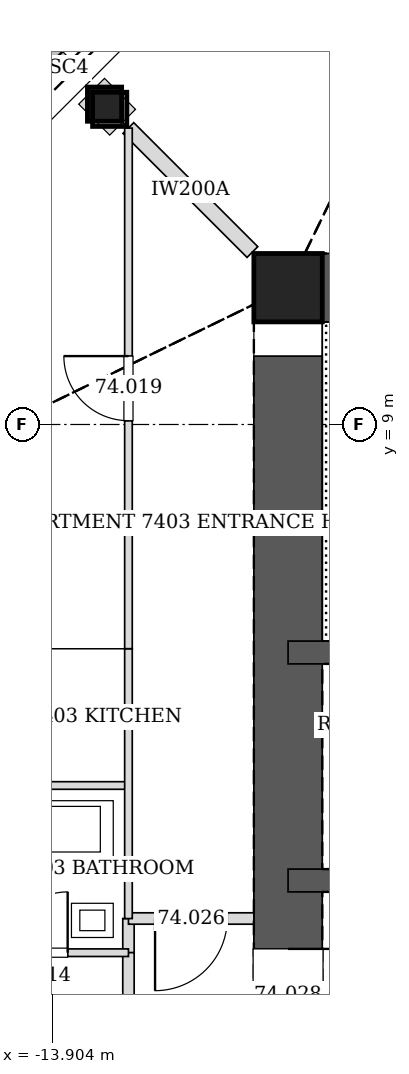
"""IFC4 building model, lengths in metres.
Left out: names, types, materials, properties, quantities, classifications, styles, units other than length and angle.
Written with IfcOpenShell. Run it as: python <this file> out.ifc"""

import sys

from ifc_helpers import new_model, si_unit, direction, frame, frame_2d, origin, origin_2d, place, context, subcontext, project, spatial, rectangle, hollow_rectangle, extrude, element, fill, save


model = new_model("IFC4")
c1 = context("Model", 3, precision=1e-05, world=origin(), true_north=direction((0.0, 1.0)))
c2 = subcontext(c1, "Body", "Model", "MODEL_VIEW")
j1 = project(units=[si_unit("LENGTHUNIT", "METRE"), si_unit("PLANEANGLEUNIT", "RADIAN")], contexts=[c1])
p1 = place(None, origin())
s1 = spatial("IfcSite", under=j1, at=p1, CompositionType="ELEMENT")
p2 = place(p1, origin())
s2 = spatial("IfcBuilding", under=s1, at=p2, CompositionType="ELEMENT")
p3 = place(p2, frame((0.0, 0.0, 301.4)))
s3 = spatial("IfcBuildingStorey", under=s2, at=p3, CompositionType="ELEMENT", Elevation=301.4)
p4 = place(p3, frame((-13.215, 13.215, 0.0), z_axis=(0.020024994503, -0.020024994503, 0.999598919162), x_axis=(0.707106781187, 0.707106781187, 0.0)))
e1 = element("IfcColumn", 1, at=p4, inside=s3, PredefinedType="COLUMN", context=c2, shape_type="SweptSolid", body=[
    extrude(hollow_rectangle(XDim=0.45, YDim=0.45, WallThickness=0.02, at=origin_2d()), origin(), (0.0, 0.0, 1.0), 3.402),
])
p5 = place(p3, frame((-10.8, 10.8, 0.0), z_axis=(0.0, 0.0, 1.0), x_axis=(1.0, 0.0, 0.0)))
e2 = element("IfcColumn", 2, at=p5, inside=s3, PredefinedType="COLUMN", context=c2, shape_type="SweptSolid", body=[
    extrude(hollow_rectangle(XDim=0.9, YDim=0.9, WallThickness=0.04, at=origin_2d()), origin(), (0.0, 0.0, 1.0), 3.4),
])
p6 = place(p3, frame((10.8, 10.8, 0.0), z_axis=(0.0, 0.0, 1.0), x_axis=(-1.0, 0.0, 0.0)))
e3 = element("IfcWall", 3, at=p6, inside=s3, PredefinedType="SOLIDWALL", context=c2, shape_type="SweptSolid", body=[
    extrude(rectangle(XDim=21.6, YDim=0.9, at=frame_2d((10.8, 0.0))), origin(), (0.0, 0.0, 1.0), 3.4),
])
p7 = place(p6, frame((10.05, 0.0, 0.0)))
e4 = element("IfcOpeningElement", 4, at=p7, cuts=e3, PredefinedType="OPENING", context=c2, shape_type="SweptSolid", body=[
    extrude(rectangle(XDim=1.5, YDim=2.1, at=frame_2d((0.75, 1.05))), frame((0.0, 0.46, 0.0), z_axis=(0.0, -1.0, 0.0), x_axis=(1.0, 0.0, 0.0)), (0.0, 0.0, 1.0), 0.92),
])
p8 = place(p3, frame((-10.8, 10.8, 0.0), z_axis=(0.0, 0.0, 1.0), x_axis=(0.0, -1.0, 0.0)))
e5 = element("IfcWall", 5, at=p8, inside=s3, PredefinedType="SOLIDWALL", context=c2, shape_type="SweptSolid", body=[
    extrude(rectangle(XDim=21.6, YDim=0.9, at=frame_2d((10.8, 0.0))), origin(), (0.0, 0.0, 1.0), 3.4),
])
p9 = place(p8, frame((8.7, 0.0, 0.0)))
e6 = element("IfcOpeningElement", 6, at=p9, cuts=e5, PredefinedType="OPENING", context=c2, shape_type="SweptSolid", body=[
    extrude(rectangle(XDim=1.2, YDim=2.1, at=frame_2d((0.6, 1.05))), frame((0.0, 0.46, 0.0), z_axis=(0.0, -1.0, 0.0), x_axis=(1.0, 0.0, 0.0)), (0.0, 0.0, 1.0), 0.92),
])
p10 = place(p8, frame((11.7, 0.0, 0.0)))
e7 = element("IfcOpeningElement", 7, at=p10, cuts=e5, PredefinedType="OPENING", context=c2, shape_type="SweptSolid", body=[
    extrude(rectangle(XDim=1.2, YDim=2.1, at=frame_2d((0.6, 1.05))), frame((0.0, 0.46, 0.0), z_axis=(0.0, -1.0, 0.0), x_axis=(1.0, 0.0, 0.0)), (0.0, 0.0, 1.0), 0.92),
])
p11 = place(p3, frame((-10.8, 3.0, 0.0), z_axis=(0.0, 0.0, 1.0), x_axis=(1.0, 0.0, 0.0)))
e8 = element("IfcWall", 8, at=p11, inside=s3, PredefinedType="SOLIDWALL", context=c2, shape_type="SweptSolid", body=[
    extrude(rectangle(XDim=21.6, YDim=0.3, at=frame_2d((10.8, 0.0))), origin(), (0.0, 0.0, 1.0), 3.4),
])
p12 = place(p11, frame((1.65, 0.0, 0.0)))
e9 = element("IfcOpeningElement", 9, at=p12, cuts=e8, PredefinedType="OPENING", context=c2, shape_type="SweptSolid", body=[
    extrude(rectangle(XDim=0.9, YDim=2.1, at=frame_2d((0.45, 1.05))), frame((0.0, 0.16, 0.0), z_axis=(0.0, -1.0, 0.0), x_axis=(1.0, 0.0, 0.0)), (0.0, 0.0, 1.0), 0.32),
])
p13 = place(p11, frame((4.55, 0.0, 0.0)))
e10 = element("IfcOpeningElement", 10, at=p13, cuts=e8, PredefinedType="OPENING", context=c2, shape_type="SweptSolid", body=[
    extrude(rectangle(XDim=0.9, YDim=2.1, at=frame_2d((0.45, 1.05))), frame((0.0, 0.16, 0.0), z_axis=(0.0, -1.0, 0.0), x_axis=(1.0, 0.0, 0.0)), (0.0, 0.0, 1.0), 0.32),
])
p14 = place(p11, frame((13.25, 0.0, 0.0)))
e11 = element("IfcOpeningElement", 11, at=p14, cuts=e8, PredefinedType="OPENING", context=c2, shape_type="SweptSolid", body=[
    extrude(rectangle(XDim=0.9, YDim=2.1, at=frame_2d((0.45, 1.05))), frame((0.0, 0.16, 0.0), z_axis=(0.0, -1.0, 0.0), x_axis=(1.0, 0.0, 0.0)), (0.0, 0.0, 1.0), 0.32),
])
p15 = place(p11, frame((16.15, 0.0, 0.0)))
e12 = element("IfcOpeningElement", 12, at=p15, cuts=e8, PredefinedType="OPENING", context=c2, shape_type="SweptSolid", body=[
    extrude(rectangle(XDim=0.9, YDim=2.1, at=frame_2d((0.45, 1.05))), frame((0.0, 0.16, 0.0), z_axis=(0.0, -1.0, 0.0), x_axis=(1.0, 0.0, 0.0)), (0.0, 0.0, 1.0), 0.32),
])
p16 = place(p11, frame((7.45, 0.0, 0.0)))
e13 = element("IfcOpeningElement", 13, at=p16, cuts=e8, PredefinedType="OPENING", context=c2, shape_type="SweptSolid", body=[
    extrude(rectangle(XDim=0.9, YDim=2.1, at=frame_2d((0.45, 1.05))), frame((0.0, 0.16, 0.0), z_axis=(0.0, -1.0, 0.0), x_axis=(1.0, 0.0, 0.0)), (0.0, 0.0, 1.0), 0.32),
])
p17 = place(p11, frame((19.05, 0.0, 0.0)))
e14 = element("IfcOpeningElement", 14, at=p17, cuts=e8, PredefinedType="OPENING", context=c2, shape_type="SweptSolid", body=[
    extrude(rectangle(XDim=0.9, YDim=2.1, at=frame_2d((0.45, 1.05))), frame((0.0, 0.16, 0.0), z_axis=(0.0, -1.0, 0.0), x_axis=(1.0, 0.0, 0.0)), (0.0, 0.0, 1.0), 0.32),
])
p18 = place(p3, frame((-10.8, 6.0, 0.0), z_axis=(0.0, 0.0, 1.0), x_axis=(1.0, 0.0, 0.0)))
e15 = element("IfcWall", 15, at=p18, inside=s3, PredefinedType="SOLIDWALL", context=c2, shape_type="SweptSolid", body=[
    extrude(rectangle(XDim=21.6, YDim=0.3, at=frame_2d((10.8, 0.0))), origin(), (0.0, 0.0, 1.0), 3.4),
])
p19 = place(p18, frame((10.25, 0.0, 0.0)))
e16 = element("IfcOpeningElement", 16, at=p19, cuts=e15, PredefinedType="OPENING", context=c2, shape_type="SweptSolid", body=[
    extrude(rectangle(XDim=1.1, YDim=2.1, at=frame_2d((0.55, 1.05))), frame((0.0, 0.16, 0.0), z_axis=(0.0, -1.0, 0.0), x_axis=(1.0, 0.0, 0.0)), (0.0, 0.0, 1.0), 0.32),
])
p20 = place(p3, frame((-12.9, 2.5, 0.0), z_axis=(0.0, 0.0, 1.0), x_axis=(0.0, -1.0, 0.0)))
e17 = element("IfcWall", 17, at=p20, inside=s3, PredefinedType="PARTITIONING", context=c2, shape_type="SweptSolid", body=[
    extrude(rectangle(XDim=0.451, YDim=0.15, at=frame_2d((0.226, 0.0))), origin(), (0.0, 0.0, 1.0), 3.2),
])
p21 = place(p3, frame((-12.9, 2.051, 0.0), z_axis=(0.0, 0.0, 1.0), x_axis=(0.0, -1.0, 0.0)))
e18 = element("IfcWall", 18, at=p21, inside=s3, PredefinedType="PARTITIONING", context=c2, shape_type="SweptSolid", body=[
    extrude(rectangle(XDim=9.602, YDim=0.15, at=frame_2d((4.801, 0.0))), origin(), (0.0, 0.0, 1.0), 2.349),
])
p22 = place(p3, frame((-11.25, 2.5, 0.0), z_axis=(0.0, 0.0, 1.0), x_axis=(-1.0, 0.0, 0.0)))
e19 = element("IfcWall", 19, at=p22, inside=s3, PredefinedType="PARTITIONING", context=c2, shape_type="SweptSolid", body=[
    extrude(rectangle(XDim=1.65, YDim=0.15, at=frame_2d((0.825, 0.0))), origin(), (0.0, 0.0, 1.0), 3.2),
])
p23 = place(p22, frame((0.35, 0.0, 0.0)))
e20 = element("IfcOpeningElement", 20, at=p23, cuts=e19, PredefinedType="OPENING", context=c2, shape_type="SweptSolid", body=[
    extrude(rectangle(XDim=0.95, YDim=2.1, at=frame_2d((0.475, 1.05))), frame((0.0, 0.085, 0.0), z_axis=(0.0, -1.0, 0.0), x_axis=(1.0, 0.0, 0.0)), (0.0, 0.0, 1.0), 0.17),
])
p24 = place(p3, frame((-12.901, 12.901, 0.0), z_axis=(0.0, 0.0, 1.0), x_axis=(0.707106781187, -0.707106781187, 0.0)))
e21 = element("IfcWall", 21, at=p24, inside=s3, PredefinedType="PARTITIONING", context=c2, shape_type="SweptSolid", body=[
    extrude(rectangle(XDim=2.308, YDim=0.2, at=frame_2d((1.154, 0.0))), origin(), (0.0, 0.0, 1.0), 2.591),
])
p25 = place(p3, frame((-15.3, 4.25, 0.0), z_axis=(0.0, 0.0, 1.0), x_axis=(1.0, 0.0, 0.0)))
e22 = element("IfcWall", 22, at=p25, inside=s3, PredefinedType="PARTITIONING", context=c2, shape_type="SweptSolid", body=[
    extrude(rectangle(XDim=2.4, YDim=0.1, at=frame_2d((1.2, 0.0))), origin(), (0.0, 0.0, 1.0), 2.662),
])
p26 = place(p3, frame((-12.9, 6.05, 0.0), z_axis=(0.0, 0.0, 1.0), x_axis=(0.0, -1.0, 0.0)))
e23 = element("IfcWall", 23, at=p26, inside=s3, PredefinedType="PARTITIONING", context=c2, shape_type="SweptSolid", body=[
    extrude(rectangle(XDim=3.551, YDim=0.1, at=frame_2d((1.775, 0.0))), origin(), (0.0, 0.0, 1.0), 3.2),
])
p27 = place(p3, frame((-15.3, 2.05, 0.0), z_axis=(0.0, 0.0, 1.0), x_axis=(1.0, 0.0, 0.0)))
e24 = element("IfcWall", 24, at=p27, inside=s3, PredefinedType="PARTITIONING", context=c2, shape_type="SweptSolid", body=[
    extrude(rectangle(XDim=2.4, YDim=0.1, at=frame_2d((1.2, 0.0))), origin(), (0.0, 0.0, 1.0), 2.662),
])
p28 = place(p27, frame((0.8, 0.0, 0.0)))
e25 = element("IfcOpeningElement", 25, at=p28, cuts=e24, PredefinedType="OPENING", context=c2, shape_type="SweptSolid", body=[
    extrude(rectangle(XDim=0.8, YDim=2.1, at=frame_2d((0.4, 1.05))), frame((0.0, 0.06, 0.0), z_axis=(0.0, -1.0, 0.0), x_axis=(1.0, 0.0, 0.0)), (0.0, 0.0, 1.0), 0.12),
])
p29 = place(p3, frame((-12.9, 6.05, 0.0), z_axis=(0.0, 0.0, 1.0), x_axis=(0.0, 1.0, 0.0)))
e26 = element("IfcWall", 26, at=p29, inside=s3, PredefinedType="PARTITIONING", context=c2, shape_type="SweptSolid", body=[
    extrude(rectangle(XDim=6.85, YDim=0.1, at=frame_2d((3.425, 0.0))), origin(), (0.0, 0.0, 1.0), 2.436),
])
p30 = place(p29, frame((3.0, 0.0, 0.0)))
e27 = element("IfcOpeningElement", 27, at=p30, cuts=e26, PredefinedType="OPENING", context=c2, shape_type="SweptSolid", body=[
    extrude(rectangle(XDim=0.85, YDim=2.1, at=frame_2d((0.425, 1.05))), frame((0.0, 0.06, 0.0), z_axis=(0.0, -1.0, 0.0), x_axis=(1.0, 0.0, 0.0)), (0.0, 0.0, 1.0), 0.12),
])
p31 = place(p28, origin())
e28 = element("IfcDoor", 28, at=p31, inside=s3, OperationType="SINGLE_SWING_RIGHT", PredefinedType="DOOR", context=c2, shape_type="SweptSolid", body=[
    extrude(rectangle(XDim=0.8, YDim=2.1, at=frame_2d((0.4, 1.05))), frame((0.0, 0.025, 0.0), z_axis=(0.0, -1.0, 0.0), x_axis=(1.0, 0.0, 0.0)), (0.0, 0.0, 1.0), 0.05),
])
fill(e25, e28)
p32 = place(p30, origin())
e29 = element("IfcDoor", 29, at=p32, inside=s3, OperationType="SINGLE_SWING_RIGHT", PredefinedType="DOOR", context=c2, shape_type="SweptSolid", body=[
    extrude(rectangle(XDim=0.85, YDim=2.1, at=frame_2d((0.425, 1.05))), frame((0.0, 0.025, 0.0), z_axis=(0.0, -1.0, 0.0), x_axis=(1.0, 0.0, 0.0)), (0.0, 0.0, 1.0), 0.05),
])
fill(e27, e29)
p33 = place(p23, origin())
e30 = element("IfcDoor", 30, at=p33, inside=s3, OperationType="SINGLE_SWING_RIGHT", PredefinedType="DOOR", context=c2, shape_type="SweptSolid", body=[
    extrude(rectangle(XDim=0.95, YDim=2.1, at=frame_2d((0.475, 1.05))), frame((0.0, 0.025, 0.0), z_axis=(0.0, -1.0, 0.0), x_axis=(1.0, 0.0, 0.0)), (0.0, 0.0, 1.0), 0.05),
])
fill(e20, e30)
p34 = place(p9, origin())
e31 = element("IfcDoor", 31, at=p34, inside=s3, OperationType="SINGLE_SWING_LEFT", PredefinedType="DOOR", context=c2, shape_type="SweptSolid", body=[
    extrude(rectangle(XDim=1.2, YDim=2.1, at=frame_2d((0.6, 1.05))), frame((0.0, 0.025, 0.0), z_axis=(0.0, -1.0, 0.0), x_axis=(1.0, 0.0, 0.0)), (0.0, 0.0, 1.0), 0.05),
])
fill(e6, e31)
save(model, sys.argv[1])
